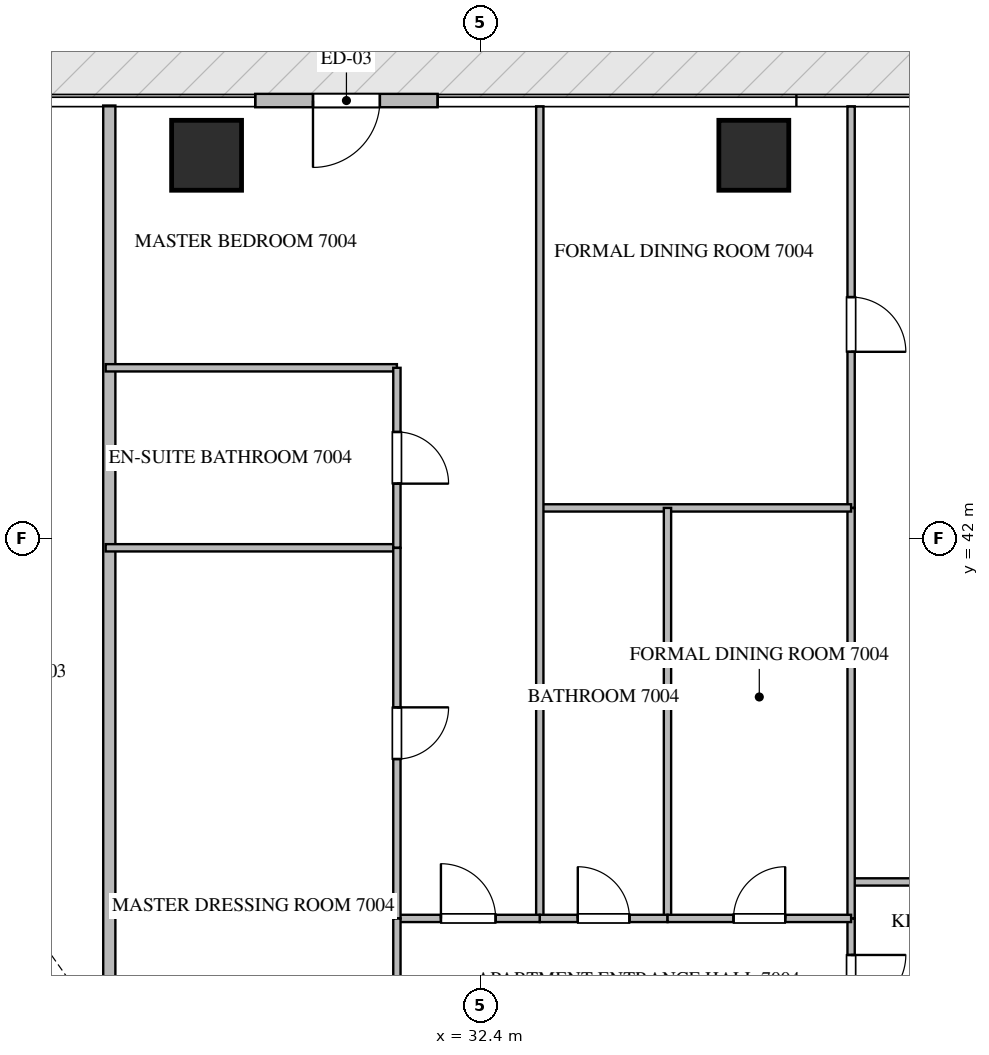
"""IFC4 building model, lengths in metres.
Left out: names, types, materials, properties, quantities, classifications, styles, units other than length and angle.
Written with IfcOpenShell. Run it as: python <this file> out.ifc"""

import sys

from ifc_helpers import new_model, si_unit, direction, frame, frame_2d, origin, origin_2d, place, context, subcontext, project, spatial, rectangle, extrude, source, transform, mapped, element, fill, save


model = new_model("IFC4")
c1 = context("Model", 3, precision=1e-05, world=origin(), true_north=direction((0.0, 1.0)))
c2 = subcontext(c1, "Body", "Model", "MODEL_VIEW")
j1 = project(units=[si_unit("LENGTHUNIT", "METRE"), si_unit("PLANEANGLEUNIT", "RADIAN")], contexts=[c1])
p1 = place(None, origin())
s1 = spatial("IfcSite", under=j1, at=p1, CompositionType="ELEMENT")
p2 = place(p1, origin())
s2 = spatial("IfcBuilding", under=s1, at=p2, CompositionType="ELEMENT")
p3 = place(p2, frame((0.0, 0.0, 279.75)))
s3 = spatial("IfcBuildingStorey", under=s2, at=p3, CompositionType="ELEMENT", Elevation=279.75)
m1 = source(origin(), c2, "Body", "SweptSolid", [
    extrude(rectangle(XDim=1.15, YDim=1.15, at=origin_2d()), origin(), (0.0, 0.0, 1.0), 3.85),
])
for number, where, z_axis, x_axis in (
    (1, (27.9, 48.3, -0.26), (0.0, 0.0, 1.0), (1.0, 0.0, 0.0)),
    (2, (36.9, 48.3, -0.26), (0.0, 0.0, 1.0), (1.0, 0.0, 0.0)),
):
    element("IfcColumn", number, at=place(p3, frame(where, z_axis=z_axis, x_axis=x_axis)), inside=s3, PredefinedType="COLUMN", context=c2, shape_type="MappedRepresentation", body=[
        mapped(m1, transform((0.0, 0.0, 0.0), scale=1.0)),
    ])
p4 = place(p3, frame((31.7, 49.2, 0.0), z_axis=(0.0, 0.0, 1.0), x_axis=(-1.0, 0.0, 0.0)))
e3 = element("IfcWall", 3, at=p4, inside=s3, PredefinedType="ELEMENTEDWALL", context=c2, shape_type="SweptSolid", body=[
    extrude(rectangle(XDim=3.0, YDim=0.22, at=frame_2d((1.5, 0.0))), origin(), (0.0, 0.0, 1.0), 3.575),
])
p5 = place(p4, frame((0.95, 0.0, 0.0)))
e4 = element("IfcOpeningElement", 4, at=p5, cuts=e3, PredefinedType="OPENING", context=c2, shape_type="SweptSolid", body=[
    extrude(rectangle(XDim=1.1, YDim=2.2, at=frame_2d((0.55, 1.1))), frame((0.0, 0.12, 0.0), z_axis=(0.0, -1.0, 0.0), x_axis=(1.0, 0.0, 0.0)), (0.0, 0.0, 1.0), 0.24),
])
p6 = place(p3, frame((26.3, 33.775, 0.0), z_axis=(0.0, 0.0, 1.0), x_axis=(0.0, 1.0, 0.0)))
e5 = element("IfcWall", 5, at=p6, inside=s3, PredefinedType="PARTITIONING", context=c2, shape_type="SweptSolid", body=[
    extrude(rectangle(XDim=15.343, YDim=0.2, at=frame_2d((7.671, 0.0))), origin(), (0.0, 0.0, 1.0), 3.59),
])
p7 = place(p3, frame((38.5, 36.35, 0.0), z_axis=(0.0, 0.0, 1.0), x_axis=(1.0, 0.0, 0.0)))
e6 = element("IfcWall", 6, at=p7, inside=s3, PredefinedType="PARTITIONING", context=c2, shape_type="SweptSolid", body=[
    extrude(rectangle(XDim=2.85, YDim=0.12, at=frame_2d((1.425, 0.0))), origin(), (0.0, 0.0, 1.0), 3.59),
])
p8 = place(p7, frame((1.0, 0.0, 0.0)))
e7 = element("IfcOpeningElement", 7, at=p8, cuts=e6, PredefinedType="OPENING", context=c2, shape_type="SweptSolid", body=[
    extrude(rectangle(XDim=0.85, YDim=2.1, at=frame_2d((0.425, 1.05))), frame((0.0, 0.07, 0.0), z_axis=(0.0, -1.0, 0.0), x_axis=(1.0, 0.0, 0.0)), (0.0, 0.0, 1.0), 0.14),
])
p9 = place(p3, frame((38.5, 35.75, 0.0), z_axis=(0.0, 0.0, 1.0), x_axis=(0.0, -1.0, 0.0)))
e8 = element("IfcWall", 8, at=p9, inside=s3, PredefinedType="PARTITIONING", context=c2, shape_type="SweptSolid", body=[
    extrude(rectangle(XDim=1.975, YDim=0.12, at=frame_2d((0.988, 0.0))), origin(), (0.0, 0.0, 1.0), 3.59),
])
p10 = place(p9, frame((0.601, 0.0, 0.0)))
e9 = element("IfcOpeningElement", 9, at=p10, cuts=e8, PredefinedType="OPENING", context=c2, shape_type="SweptSolid", body=[
    extrude(rectangle(XDim=0.9, YDim=2.1, at=frame_2d((0.45, 1.05))), frame((0.0, 0.07, 0.0), z_axis=(0.0, -1.0, 0.0), x_axis=(1.0, 0.0, 0.0)), (0.0, 0.0, 1.0), 0.14),
])
p11 = place(p3, frame((38.5, 49.105, 0.0), z_axis=(0.0, 0.0, 1.0), x_axis=(0.0, -1.0, 0.0)))
e10 = element("IfcWall", 10, at=p11, inside=s3, PredefinedType="PARTITIONING", context=c2, shape_type="SweptSolid", body=[
    extrude(rectangle(XDim=6.604, YDim=0.12, at=frame_2d((3.302, 0.0))), origin(), (0.0, 0.0, 1.0), 3.59),
])
p12 = place(p11, frame((3.137, 0.0, 0.0)))
e11 = element("IfcOpeningElement", 11, at=p12, cuts=e10, PredefinedType="OPENING", context=c2, shape_type="SweptSolid", body=[
    extrude(rectangle(XDim=0.9, YDim=2.1, at=frame_2d((0.45, 1.05))), frame((0.0, 0.07, 0.0), z_axis=(0.0, -1.0, 0.0), x_axis=(1.0, 0.0, 0.0)), (0.0, 0.0, 1.0), 0.14),
])
p13 = place(p3, frame((38.5, 42.499, 0.0), z_axis=(0.0, 0.0, 1.0), x_axis=(0.0, -1.0, 0.0)))
e12 = element("IfcWall", 12, at=p13, inside=s3, PredefinedType="PARTITIONING", context=c2, shape_type="SweptSolid", body=[
    extrude(rectangle(XDim=6.747, YDim=0.12, at=frame_2d((3.374, 0.0))), origin(), (0.0, 0.0, 1.0), 3.59),
])
p14 = place(p3, frame((33.38, 42.501, 0.0), z_axis=(0.0, 0.0, 1.0), x_axis=(1.0, 0.0, 0.0)))
e13 = element("IfcWall", 13, at=p14, inside=s3, PredefinedType="PARTITIONING", context=c2, shape_type="SweptSolid", body=[
    extrude(rectangle(XDim=5.12, YDim=0.12, at=frame_2d((2.56, 0.0))), origin(), (0.0, 0.0, 1.0), 3.59),
])
p15 = place(p3, frame((33.38, 49.105, 0.0), z_axis=(0.0, 0.0, 1.0), x_axis=(0.0, -1.0, 0.0)))
e14 = element("IfcWall", 14, at=p15, inside=s3, PredefinedType="PARTITIONING", context=c2, shape_type="SweptSolid", body=[
    extrude(rectangle(XDim=13.355, YDim=0.12, at=frame_2d((6.677, 0.0))), origin(), (0.0, 0.0, 1.0), 3.59),
])
p16 = place(p3, frame((35.48, 42.501, 0.0), z_axis=(0.0, 0.0, 1.0), x_axis=(0.0, -1.0, 0.0)))
e15 = element("IfcWall", 15, at=p16, inside=s3, PredefinedType="PARTITIONING", context=c2, shape_type="SweptSolid", body=[
    extrude(rectangle(XDim=6.751, YDim=0.12, at=frame_2d((3.375, 0.0))), origin(), (0.0, 0.0, 1.0), 3.59),
])
p17 = place(p3, frame((33.38, 35.75, 0.0), z_axis=(0.0, 0.0, 1.0), x_axis=(1.0, 0.0, 0.0)))
e16 = element("IfcWall", 16, at=p17, inside=s3, PredefinedType="PARTITIONING", context=c2, shape_type="SweptSolid", body=[
    extrude(rectangle(XDim=2.1, YDim=0.12, at=frame_2d((1.05, 0.0))), origin(), (0.0, 0.0, 1.0), 3.59),
])
p18 = place(p17, frame((0.625, 0.0, 0.0)))
e17 = element("IfcOpeningElement", 17, at=p18, cuts=e16, PredefinedType="OPENING", context=c2, shape_type="SweptSolid", body=[
    extrude(rectangle(XDim=0.85, YDim=2.1, at=frame_2d((0.425, 1.05))), frame((0.0, 0.07, 0.0), z_axis=(0.0, -1.0, 0.0), x_axis=(1.0, 0.0, 0.0)), (0.0, 0.0, 1.0), 0.14),
])
p19 = place(p3, frame((35.482, 35.75, 0.0), z_axis=(0.0, 0.0, 1.0), x_axis=(1.0, 0.0, 0.0)))
e18 = element("IfcWall", 18, at=p19, inside=s3, PredefinedType="PARTITIONING", context=c2, shape_type="SweptSolid", body=[
    extrude(rectangle(XDim=3.018, YDim=0.12, at=frame_2d((1.509, 0.0))), origin(), (0.0, 0.0, 1.0), 3.59),
])
p20 = place(p19, frame((1.084, 0.0, 0.0)))
e19 = element("IfcOpeningElement", 19, at=p20, cuts=e18, PredefinedType="OPENING", context=c2, shape_type="SweptSolid", body=[
    extrude(rectangle(XDim=0.85, YDim=2.1, at=frame_2d((0.425, 1.05))), frame((0.0, 0.07, 0.0), z_axis=(0.0, -1.0, 0.0), x_axis=(1.0, 0.0, 0.0)), (0.0, 0.0, 1.0), 0.14),
])
p21 = place(p3, frame((31.03, 35.75, 0.0), z_axis=(0.0, 0.0, 1.0), x_axis=(1.0, 0.0, 0.0)))
e20 = element("IfcWall", 20, at=p21, inside=s3, PredefinedType="PARTITIONING", context=c2, shape_type="SweptSolid", body=[
    extrude(rectangle(XDim=2.348, YDim=0.12, at=frame_2d((1.174, 0.0))), origin(), (0.0, 0.0, 1.0), 3.59),
])
p22 = place(p21, frame((0.724, 0.0, 0.0)))
e21 = element("IfcOpeningElement", 21, at=p22, cuts=e20, PredefinedType="OPENING", context=c2, shape_type="SweptSolid", body=[
    extrude(rectangle(XDim=0.9, YDim=2.1, at=frame_2d((0.45, 1.05))), frame((0.0, 0.07, 0.0), z_axis=(0.0, -1.0, 0.0), x_axis=(1.0, 0.0, 0.0)), (0.0, 0.0, 1.0), 0.14),
])
for number, where, z_axis, x_axis in (
    (22, (26.24, 44.805, 0.0), (0.0, 0.0, 1.0), (1.0, 0.0, 0.0)),
    (23, (26.24, 41.845, 0.0), (0.0, 0.0, 1.0), (1.0, 0.0, 0.0)),
):
    element("IfcWall", number, at=place(p3, frame(where, z_axis=z_axis, x_axis=x_axis)), inside=s3, PredefinedType="PARTITIONING", context=c2, shape_type="SweptSolid", body=[
        extrude(rectangle(XDim=4.79, YDim=0.12, at=frame_2d((2.395, 0.0))), origin(), (0.0, 0.0, 1.0), 3.59),
    ])
p23 = place(p3, frame((31.03, 44.805, 0.0), z_axis=(0.0, 0.0, 1.0), x_axis=(0.0, -1.0, 0.0)))
e24 = element("IfcWall", 24, at=p23, inside=s3, PredefinedType="PARTITIONING", context=c2, shape_type="SweptSolid", body=[
    extrude(rectangle(XDim=2.96, YDim=0.12, at=frame_2d((1.48, 0.0))), origin(), (0.0, 0.0, 1.0), 3.59),
])
p24 = place(p23, frame((1.055, 0.0, 0.0)))
e25 = element("IfcOpeningElement", 25, at=p24, cuts=e24, PredefinedType="OPENING", context=c2, shape_type="SweptSolid", body=[
    extrude(rectangle(XDim=0.85, YDim=2.1, at=frame_2d((0.425, 1.05))), frame((0.0, 0.07, 0.0), z_axis=(0.0, -1.0, 0.0), x_axis=(1.0, 0.0, 0.0)), (0.0, 0.0, 1.0), 0.14),
])
p25 = place(p3, frame((31.03, 41.843, 0.0), z_axis=(0.0, 0.0, 1.0), x_axis=(0.0, -1.0, 0.0)))
e26 = element("IfcWall", 26, at=p25, inside=s3, PredefinedType="PARTITIONING", context=c2, shape_type="SweptSolid", body=[
    extrude(rectangle(XDim=6.093, YDim=0.12, at=frame_2d((3.046, 0.0))), origin(), (0.0, 0.0, 1.0), 3.59),
])
p26 = place(p25, frame((2.622, 0.0, 0.0)))
e27 = element("IfcOpeningElement", 27, at=p26, cuts=e26, PredefinedType="OPENING", context=c2, shape_type="SweptSolid", body=[
    extrude(rectangle(XDim=0.85, YDim=2.1, at=frame_2d((0.425, 1.05))), frame((0.0, 0.07, 0.0), z_axis=(0.0, -1.0, 0.0), x_axis=(1.0, 0.0, 0.0)), (0.0, 0.0, 1.0), 0.14),
])
p27 = place(p3, frame((31.03, 35.748, 0.0), z_axis=(0.0, 0.0, 1.0), x_axis=(0.0, -1.0, 0.0)))
e28 = element("IfcWall", 28, at=p27, inside=s3, PredefinedType="PARTITIONING", context=c2, shape_type="SweptSolid", body=[
    extrude(rectangle(XDim=1.973, YDim=0.12, at=frame_2d((0.987, 0.0))), origin(), (0.0, 0.0, 1.0), 3.59),
])
m2 = source(origin(), c2, "Body", "SweptSolid", [
    extrude(rectangle(XDim=1.1, YDim=2.2, at=frame_2d((0.55, 1.1))), frame((0.0, 0.025, 0.0), z_axis=(0.0, -1.0, 0.0), x_axis=(1.0, 0.0, 0.0)), (0.0, 0.0, 1.0), 0.05),
])
p28 = place(p5, origin())
e29 = element("IfcDoor", 29, at=p28, inside=s3, OperationType="SINGLE_SWING_RIGHT", PredefinedType="DOOR", context=c2, shape_type="MappedRepresentation", body=[
    mapped(m2, transform((0.0, 0.0, 0.0), scale=1.0)),
])
fill(e4, e29)
m3 = source(origin(), c2, "Body", "SweptSolid", [
    extrude(rectangle(XDim=0.9, YDim=2.1, at=frame_2d((0.45, 1.05))), frame((0.0, 0.025, 0.0), z_axis=(0.0, -1.0, 0.0), x_axis=(1.0, 0.0, 0.0)), (0.0, 0.0, 1.0), 0.05),
])
p29 = place(p10, origin())
e30 = element("IfcDoor", 30, at=p29, inside=s3, OperationType="SINGLE_SWING_LEFT", PredefinedType="DOOR", context=c2, shape_type="MappedRepresentation", body=[
    mapped(m3, transform((0.0, 0.0, 0.0), scale=1.0)),
])
fill(e9, e30)
p30 = place(p12, origin())
e31 = element("IfcDoor", 31, at=p30, inside=s3, OperationType="SINGLE_SWING_RIGHT", PredefinedType="DOOR", context=c2, shape_type="MappedRepresentation", body=[
    mapped(m3, transform((0.0, 0.0, 0.0), scale=1.0)),
])
fill(e11, e31)
m4 = source(origin(), c2, "Body", "SweptSolid", [
    extrude(rectangle(XDim=0.85, YDim=2.1, at=frame_2d((0.425, 1.05))), frame((0.0, 0.025, 0.0), z_axis=(0.0, -1.0, 0.0), x_axis=(1.0, 0.0, 0.0)), (0.0, 0.0, 1.0), 0.05),
])
p31 = place(p18, origin())
e32 = element("IfcDoor", 32, at=p31, inside=s3, OperationType="SINGLE_SWING_LEFT", PredefinedType="DOOR", context=c2, shape_type="MappedRepresentation", body=[
    mapped(m4, transform((0.0, 0.0, 0.0), scale=1.0)),
])
fill(e17, e32)
p32 = place(p20, origin())
e33 = element("IfcDoor", 33, at=p32, inside=s3, OperationType="SINGLE_SWING_RIGHT", PredefinedType="DOOR", context=c2, shape_type="MappedRepresentation", body=[
    mapped(m4, transform((0.0, 0.0, 0.0), scale=1.0)),
])
fill(e19, e33)
p33 = place(p22, origin())
e34 = element("IfcDoor", 34, at=p33, inside=s3, OperationType="SINGLE_SWING_LEFT", PredefinedType="DOOR", context=c2, shape_type="MappedRepresentation", body=[
    mapped(m3, transform((0.0, 0.0, 0.0), scale=1.0)),
])
fill(e21, e34)
p34 = place(p24, origin())
e35 = element("IfcDoor", 35, at=p34, inside=s3, OperationType="SINGLE_SWING_RIGHT", PredefinedType="DOOR", context=c2, shape_type="MappedRepresentation", body=[
    mapped(m4, transform((0.0, 0.0, 0.0), scale=1.0)),
])
fill(e25, e35)
p35 = place(p26, origin())
e36 = element("IfcDoor", 36, at=p35, inside=s3, OperationType="SINGLE_SWING_LEFT", PredefinedType="DOOR", context=c2, shape_type="MappedRepresentation", body=[
    mapped(m4, transform((0.0, 0.0, 0.0), scale=1.0)),
])
fill(e27, e36)
save(model, sys.argv[1])
